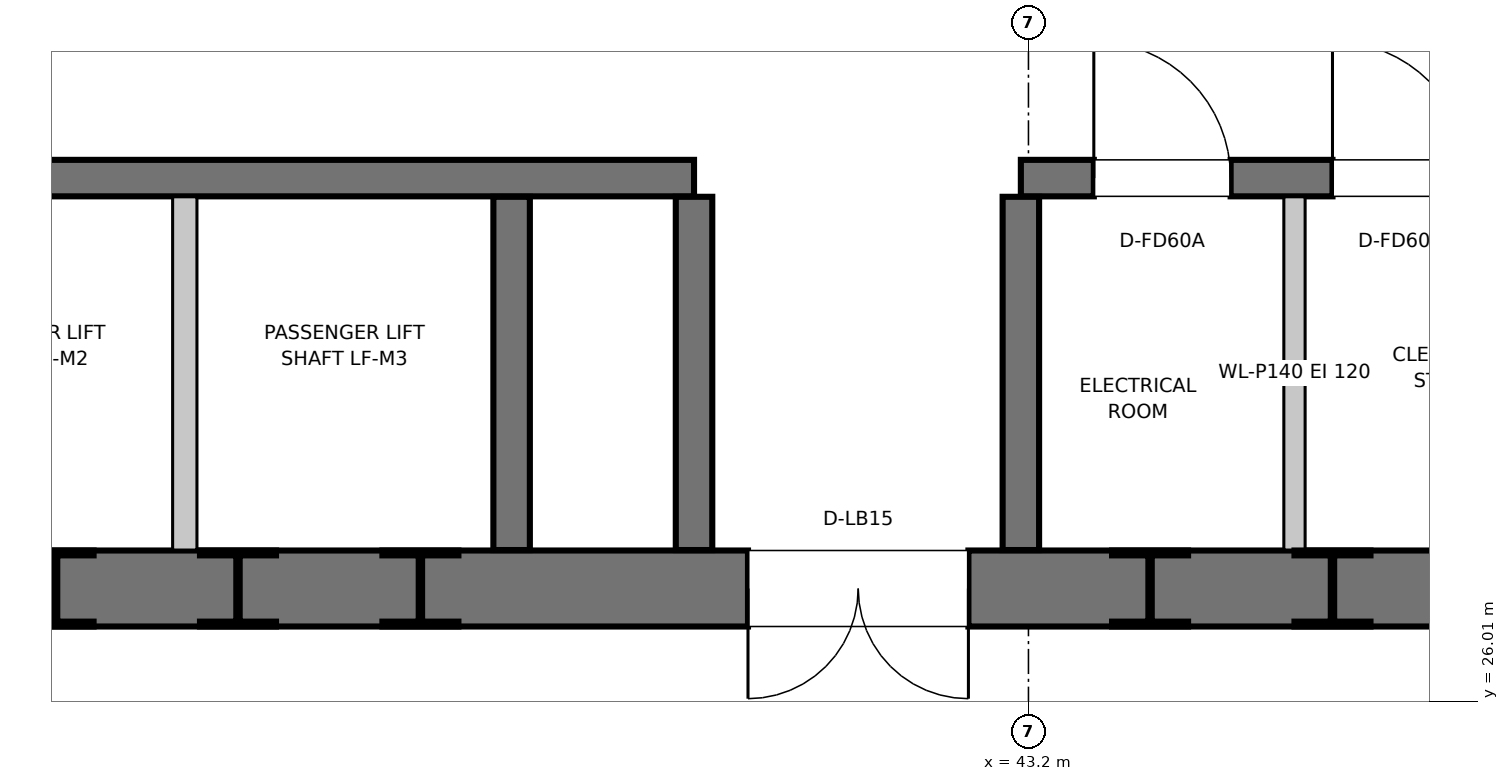
"""IFC4 building model, lengths in metres.
Left out: names, types, materials, properties, quantities, classifications, styles, units other than length and angle.
Written with IfcOpenShell. Run it as: python <this file> out.ifc"""

import sys

from ifc_helpers import new_model, si_unit, direction, frame, frame_2d, origin, origin_2d, place, context, subcontext, project, spatial, rectangle, i_section, extrude, element, fill, save


model = new_model("IFC4")
c1 = context("Model", 3, precision=1e-05, world=origin(), true_north=direction((0.0, 1.0)))
c2 = subcontext(c1, "Body", "Model", "MODEL_VIEW")
j1 = project(units=[si_unit("LENGTHUNIT", "METRE"), si_unit("PLANEANGLEUNIT", "RADIAN")], contexts=[c1])
p1 = place(None, origin())
s1 = spatial("IfcSite", under=j1, at=p1, CompositionType="ELEMENT")
p2 = place(p1, origin())
s2 = spatial("IfcBuilding", under=s1, at=p2, CompositionType="ELEMENT")
p3 = place(p2, frame((0.0, 0.0, -5.4)))
s3 = spatial("IfcBuildingStorey", under=s2, at=p3, CompositionType="ELEMENT", Elevation=-5.4)
for number, where, z_axis, x_axis in (
    (1, (36.8, 26.75, 0.0), (0.0, 0.0, 1.0), (1.0, 0.0, 0.0)),
    (2, (39.2, 26.75, 0.0), (0.0, 0.0, 1.0), (1.0, 0.0, 0.0)),
    (3, (45.2, 26.75, 0.0), (0.0, 0.0, 1.0), (1.0, 0.0, 0.0)),
    (4, (38.0, 26.75, 0.0), (0.0, 0.0, 1.0), (1.0, 0.0, 0.0)),
    (5, (44.0, 26.75, 0.0), (0.0, 0.0, 1.0), (1.0, 0.0, 0.0)),
):
    element("IfcColumn", number, at=place(p3, frame(where, z_axis=z_axis, x_axis=x_axis)), inside=s3, PredefinedType="COLUMN", context=c2, shape_type="SweptSolid", body=[
        extrude(i_section(OverallWidth=0.5, OverallDepth=0.5, WebThickness=0.022, FlangeThickness=0.032, at=origin_2d()), origin(), (0.0, 0.0, 1.0), 5.4),
    ])
p4 = place(p3, frame((21.65, 26.75, 0.0), z_axis=(0.0, 0.0, 1.0), x_axis=(1.0, 0.0, 0.0)))
e6 = element("IfcWall", 6, at=p4, inside=s3, PredefinedType="SHEAR", context=c2, shape_type="SweptSolid", body=[
    extrude(rectangle(XDim=28.7, YDim=0.5, at=frame_2d((14.35, 0.0))), origin(), (0.0, 0.0, 1.0), 5.4),
])
p5 = place(p4, frame((1.375, 0.0, 0.0)))
e7 = element("IfcOpeningElement", 7, at=p5, cuts=e6, PredefinedType="OPENING", context=c2, shape_type="SweptSolid", body=[
    extrude(rectangle(XDim=1.05, YDim=2.0, at=frame_2d((0.525, 1.0))), frame((0.0, 0.26, 0.0), z_axis=(0.0, -1.0, 0.0), x_axis=(1.0, 0.0, 0.0)), (0.0, 0.0, 1.0), 0.52),
])
p6 = place(p4, frame((5.375, 0.0, 0.0)))
e8 = element("IfcOpeningElement", 8, at=p6, cuts=e6, PredefinedType="OPENING", context=c2, shape_type="SweptSolid", body=[
    extrude(rectangle(XDim=1.05, YDim=2.0, at=frame_2d((0.525, 1.0))), frame((0.0, 0.26, 0.0), z_axis=(0.0, -1.0, 0.0), x_axis=(1.0, 0.0, 0.0)), (0.0, 0.0, 1.0), 0.52),
])
p7 = place(p4, frame((9.575, 0.0, 0.0)))
e9 = element("IfcOpeningElement", 9, at=p7, cuts=e6, PredefinedType="OPENING", context=c2, shape_type="SweptSolid", body=[
    extrude(rectangle(XDim=1.05, YDim=2.0, at=frame_2d((0.525, 1.0))), frame((0.0, 0.26, 0.0), z_axis=(0.0, -1.0, 0.0), x_axis=(1.0, 0.0, 0.0)), (0.0, 0.0, 1.0), 0.52),
])
p8 = place(p4, frame((19.705, 0.0, 0.0)))
e10 = element("IfcOpeningElement", 10, at=p8, cuts=e6, PredefinedType="OPENING", context=c2, shape_type="SweptSolid", body=[
    extrude(rectangle(XDim=1.45, YDim=2.0, at=frame_2d((0.725, 1.0))), frame((0.0, 0.26, 0.0), z_axis=(0.0, -1.0, 0.0), x_axis=(1.0, 0.0, 0.0)), (0.0, 0.0, 1.0), 0.52),
])
p9 = place(p4, frame((26.275, 0.0, 0.0)))
e11 = element("IfcOpeningElement", 11, at=p9, cuts=e6, PredefinedType="OPENING", context=c2, shape_type="SweptSolid", body=[
    extrude(rectangle(XDim=1.05, YDim=2.0, at=frame_2d((0.525, 1.0))), frame((0.0, 0.26, 0.0), z_axis=(0.0, -1.0, 0.0), x_axis=(1.0, 0.0, 0.0)), (0.0, 0.0, 1.0), 0.52),
])
p10 = place(p3, frame((33.493, 29.45, 0.0), z_axis=(0.0, 0.0, 1.0), x_axis=(1.0, 0.0, 0.0)))
e12 = element("IfcWall", 12, at=p10, inside=s3, PredefinedType="SHEAR", context=c2, shape_type="SweptSolid", body=[
    extrude(rectangle(XDim=7.507, YDim=0.24, at=frame_2d((3.753, 0.0))), origin(), (0.0, 0.0, 1.0), 5.4),
])
p11 = place(p3, frame((43.15, 29.45, 0.0), z_axis=(0.0, 0.0, 1.0), x_axis=(1.0, 0.0, 0.0)))
e13 = element("IfcWall", 13, at=p11, inside=s3, PredefinedType="SHEAR", context=c2, shape_type="SweptSolid", body=[
    extrude(rectangle(XDim=3.557, YDim=0.24, at=frame_2d((1.779, 0.0))), origin(), (0.0, 0.0, 1.0), 5.4),
])
p12 = place(p11, frame((0.48, 0.0, 0.0)))
e14 = element("IfcOpeningElement", 14, at=p12, cuts=e13, PredefinedType="OPENING", context=c2, shape_type="SweptSolid", body=[
    extrude(rectangle(XDim=0.9, YDim=2.0, at=frame_2d((0.45, 1.0))), frame((0.0, 0.13, 0.0), z_axis=(0.0, -1.0, 0.0), x_axis=(1.0, 0.0, 0.0)), (0.0, 0.0, 1.0), 0.26),
])
p13 = place(p11, frame((2.05, 0.0, 0.0)))
e15 = element("IfcOpeningElement", 15, at=p13, cuts=e13, PredefinedType="OPENING", context=c2, shape_type="SweptSolid", body=[
    extrude(rectangle(XDim=0.9, YDim=2.0, at=frame_2d((0.45, 1.0))), frame((0.0, 0.13, 0.0), z_axis=(0.0, -1.0, 0.0), x_axis=(1.0, 0.0, 0.0)), (0.0, 0.0, 1.0), 0.26),
])
for number, where, z_axis, x_axis in (
    (16, (41.0, 27.003, 0.0), (0.0, 0.0, 1.0), (0.0, 1.0, 0.0)),
    (17, (43.15, 27.003, 0.0), (0.0, 0.0, 1.0), (0.0, 1.0, 0.0)),
    (18, (39.8, 27.003, 0.0), (0.0, 0.0, 1.0), (0.0, 1.0, 0.0)),
):
    element("IfcWall", number, at=place(p3, frame(where, z_axis=z_axis, x_axis=x_axis)), inside=s3, PredefinedType="SHEAR", context=c2, shape_type="SweptSolid", body=[
        extrude(rectangle(XDim=2.324, YDim=0.24, at=frame_2d((1.162, 0.0))), origin(), (0.0, 0.0, 1.0), 5.4),
    ])
p14 = place(p3, frame((37.65, 27.003, 0.0), z_axis=(0.0, 0.0, 1.0), x_axis=(0.0, 1.0, 0.0)))
e19 = element("IfcWall", 19, at=p14, inside=s3, PredefinedType="MOVABLE", context=c2, shape_type="SweptSolid", body=[
    extrude(rectangle(XDim=2.324, YDim=0.16, at=frame_2d((1.162, 0.0))), origin(), (0.0, 0.0, 1.0), 5.085),
])
p15 = place(p3, frame((44.95, 27.003, 0.0), z_axis=(0.0, 0.0, 1.0), x_axis=(0.0, 1.0, 0.0)))
e20 = element("IfcWall", 20, at=p15, inside=s3, PredefinedType="PARTITIONING", context=c2, shape_type="SweptSolid", body=[
    extrude(rectangle(XDim=2.324, YDim=0.14, at=frame_2d((1.162, 0.0))), origin(), (0.0, 0.0, 1.0), 5.085),
])
p16 = place(p12, origin())
e21 = element("IfcDoor", 21, at=p16, inside=s3, OperationType="SINGLE_SWING_LEFT", PredefinedType="DOOR", context=c2, shape_type="SweptSolid", body=[
    extrude(rectangle(XDim=0.9, YDim=2.0, at=frame_2d((0.45, 1.0))), frame((0.0, 0.025, 0.0), z_axis=(0.0, -1.0, 0.0), x_axis=(1.0, 0.0, 0.0)), (0.0, 0.0, 1.0), 0.05),
])
fill(e14, e21)
p17 = place(p13, origin())
e22 = element("IfcDoor", 22, at=p17, inside=s3, OperationType="SINGLE_SWING_LEFT", PredefinedType="DOOR", context=c2, shape_type="SweptSolid", body=[
    extrude(rectangle(XDim=0.9, YDim=2.0, at=frame_2d((0.45, 1.0))), frame((0.0, 0.025, 0.0), z_axis=(0.0, -1.0, 0.0), x_axis=(1.0, 0.0, 0.0)), (0.0, 0.0, 1.0), 0.05),
])
fill(e15, e22)
p18 = place(p8, frame((1.45, 0.0, 0.0), z_axis=(0.0, 0.0, 1.0), x_axis=(-1.0, 0.0, 0.0)))
e23 = element("IfcDoor", 23, at=p18, inside=s3, OperationType="DOUBLE_DOOR_SINGLE_SWING", PredefinedType="DOOR", context=c2, shape_type="SweptSolid", body=[
    extrude(rectangle(XDim=1.45, YDim=2.0, at=frame_2d((0.725, 1.0))), frame((0.0, 0.025, 0.0), z_axis=(0.0, -1.0, 0.0), x_axis=(1.0, 0.0, 0.0)), (0.0, 0.0, 1.0), 0.05),
])
fill(e10, e23)
save(model, sys.argv[1])
